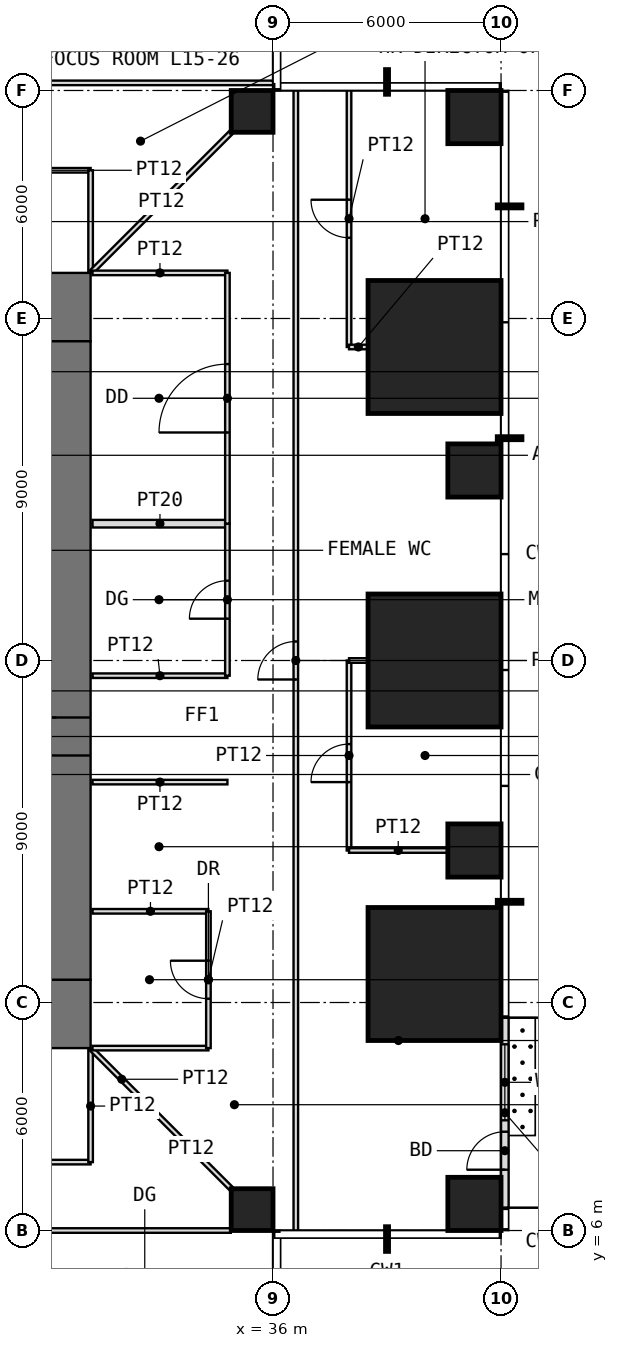
"""IFC4 building model, lengths in metres.
Left out: names, types, materials, properties, quantities, classifications, styles, units other than length and angle.
Written with IfcOpenShell. Run it as: python <this file> out.ifc"""

import sys

from ifc_helpers import new_model, si_unit, direction, frame, frame_2d, origin, origin_2d, place, context, subcontext, project, spatial, rectangle, extrude, element, fill, save


model = new_model("IFC4")
c1 = context("Model", 3, precision=1e-05, world=origin(), true_north=direction((0.0, 1.0)))
c2 = subcontext(c1, "Body", "Model", "MODEL_VIEW")
j1 = project(units=[si_unit("LENGTHUNIT", "METRE"), si_unit("PLANEANGLEUNIT", "RADIAN")], contexts=[c1])
p1 = place(None, origin())
s1 = spatial("IfcSite", under=j1, at=p1, CompositionType="ELEMENT")
p2 = place(p1, origin())
s2 = spatial("IfcBuilding", under=s1, at=p2, CompositionType="ELEMENT")
p3 = place(p2, frame((0.0, 0.0, 66.5)))
s3 = spatial("IfcBuildingStorey", under=s2, at=p3, CompositionType="ELEMENT", Elevation=66.5)
p4 = place(p3, frame((35.45, 6.55, 0.0), z_axis=(0.0, 0.0, 1.0), x_axis=(1.0, 0.0, 0.0)))
e1 = element("IfcColumn", 1, at=p4, inside=s3, PredefinedType="COLUMN", context=c2, shape_type="SweptSolid", body=[
    extrude(rectangle(XDim=1.1, YDim=1.1, at=origin_2d()), origin(), (0.0, 0.0, 1.0), 4.0),
])
p5 = place(p3, frame((41.3, 6.7, 0.0), z_axis=(0.0, 0.0, 1.0), x_axis=(1.0, 0.0, 0.0)))
e2 = element("IfcColumn", 2, at=p5, inside=s3, PredefinedType="COLUMN", context=c2, shape_type="SweptSolid", body=[
    extrude(rectangle(XDim=1.4, YDim=1.4, at=origin_2d()), origin(), (0.0, 0.0, 1.0), 4.0),
])
p6 = place(p3, frame((40.25, 12.75, 0.0), z_axis=(0.0, 0.0, 1.0), x_axis=(1.0, 0.0, 0.0)))
e3 = element("IfcColumn", 3, at=p6, inside=s3, PredefinedType="COLUMN", context=c2, shape_type="SweptSolid", body=[
    extrude(rectangle(XDim=3.5, YDim=3.5, at=origin_2d()), origin(), (0.0, 0.0, 1.0), 4.0),
])
p7 = place(p3, frame((41.3, 16.0, 0.0), z_axis=(0.0, 0.0, 1.0), x_axis=(1.0, 0.0, 0.0)))
e4 = element("IfcColumn", 4, at=p7, inside=s3, PredefinedType="COLUMN", context=c2, shape_type="SweptSolid", body=[
    extrude(rectangle(XDim=1.4, YDim=1.4, at=origin_2d()), origin(), (0.0, 0.0, 1.0), 4.0),
])
p8 = place(p3, frame((40.25, 21.0, 0.0), z_axis=(0.0, 0.0, 1.0), x_axis=(1.0, 0.0, 0.0)))
e5 = element("IfcColumn", 5, at=p8, inside=s3, PredefinedType="COLUMN", context=c2, shape_type="SweptSolid", body=[
    extrude(rectangle(XDim=3.5, YDim=3.5, at=origin_2d()), origin(), (0.0, 0.0, 1.0), 4.0),
])
p9 = place(p3, frame((41.3, 26.0, 0.0), z_axis=(0.0, 0.0, 1.0), x_axis=(1.0, 0.0, 0.0)))
e6 = element("IfcColumn", 6, at=p9, inside=s3, PredefinedType="COLUMN", context=c2, shape_type="SweptSolid", body=[
    extrude(rectangle(XDim=1.4, YDim=1.4, at=origin_2d()), origin(), (0.0, 0.0, 1.0), 4.0),
])
p10 = place(p3, frame((40.25, 29.25, 0.0), z_axis=(0.0, 0.0, 1.0), x_axis=(1.0, 0.0, 0.0)))
e7 = element("IfcColumn", 7, at=p10, inside=s3, PredefinedType="COLUMN", context=c2, shape_type="SweptSolid", body=[
    extrude(rectangle(XDim=3.5, YDim=3.5, at=origin_2d()), origin(), (0.0, 0.0, 1.0), 4.0),
])
p11 = place(p3, frame((35.45, 35.45, 0.0), z_axis=(0.0, 0.0, 1.0), x_axis=(1.0, 0.0, 0.0)))
e8 = element("IfcColumn", 8, at=p11, inside=s3, PredefinedType="COLUMN", context=c2, shape_type="SweptSolid", body=[
    extrude(rectangle(XDim=1.1, YDim=1.1, at=origin_2d()), origin(), (0.0, 0.0, 1.0), 4.0),
])
p12 = place(p3, frame((41.3, 35.3, 0.0), z_axis=(0.0, 0.0, 1.0), x_axis=(1.0, 0.0, 0.0)))
e9 = element("IfcColumn", 9, at=p12, inside=s3, PredefinedType="COLUMN", context=c2, shape_type="SweptSolid", body=[
    extrude(rectangle(XDim=1.4, YDim=1.4, at=origin_2d()), origin(), (0.0, 0.0, 1.0), 4.0),
])
p13 = place(p3, frame((42.1, 6.6, 0.0), z_axis=(0.0, 0.0, 1.0), x_axis=(0.0, 1.0, 0.0)))
e10 = element("IfcWall", 10, at=p13, inside=s3, PredefinedType="USERDEFINED", context=c2, shape_type="SweptSolid", body=[
    extrude(rectangle(XDim=5.0, YDim=0.2, at=frame_2d((2.5, 0.0))), origin(), (0.0, 0.0, 1.0), 3.75),
])
p14 = place(p13, frame((1.0, 0.0, 0.0)))
e11 = element("IfcOpeningElement", 11, at=p14, cuts=e10, PredefinedType="OPENING", context=c2, shape_type="SweptSolid", body=[
    extrude(rectangle(XDim=1.0, YDim=2.4, at=frame_2d((0.5, 1.2))), frame((0.0, 0.11, 0.0), z_axis=(0.0, -1.0, 0.0), x_axis=(1.0, 0.0, 0.0)), (0.0, 0.0, 1.0), 0.22),
])
p15 = place(p13, frame((2.3, 0.0, 0.3)))
e12 = element("IfcOpeningElement", 12, at=p15, cuts=e10, PredefinedType="OPENING", context=c2, shape_type="SweptSolid", body=[
    extrude(rectangle(XDim=2.0, YDim=2.7, at=frame_2d((1.0, 1.35))), frame((0.0, 0.11, 0.0), z_axis=(0.0, -1.0, 0.0), x_axis=(1.0, 0.0, 0.0)), (0.0, 0.0, 1.0), 0.22),
])
p16 = place(p3, frame((10.8, 11.7, -0.05), z_axis=(0.0, 0.0, 1.0), x_axis=(1.0, 0.0, 0.0)))
e13 = element("IfcWall", 13, at=p16, inside=s3, PredefinedType="SHEAR", context=c2, shape_type="SweptSolid", body=[
    extrude(rectangle(XDim=20.4, YDim=1.8, at=frame_2d((10.2, 0.0))), origin(), (0.0, 0.0, 1.0), 4.0),
])
p17 = place(p16, frame((9.2, 0.0, 0.05)))
e14 = element("IfcOpeningElement", 14, at=p17, cuts=e13, PredefinedType="OPENING", context=c2, shape_type="SweptSolid", body=[
    extrude(rectangle(XDim=2.0, YDim=2.2, at=frame_2d((1.0, 1.1))), frame((0.0, 0.91, 0.0), z_axis=(0.0, -1.0, 0.0), x_axis=(1.0, 0.0, 0.0)), (0.0, 0.0, 1.0), 1.82),
])
p18 = place(p3, frame((10.8, 30.3, -0.05), z_axis=(0.0, 0.0, 1.0), x_axis=(1.0, 0.0, 0.0)))
e15 = element("IfcWall", 15, at=p18, inside=s3, PredefinedType="SHEAR", context=c2, shape_type="SweptSolid", body=[
    extrude(rectangle(XDim=20.4, YDim=1.8, at=frame_2d((10.2, 0.0))), origin(), (0.0, 0.0, 1.0), 4.0),
])
p19 = place(p18, frame((9.2, 0.0, 0.05)))
e16 = element("IfcOpeningElement", 16, at=p19, cuts=e15, PredefinedType="OPENING", context=c2, shape_type="SweptSolid", body=[
    extrude(rectangle(XDim=2.0, YDim=2.2, at=frame_2d((1.0, 1.1))), frame((0.0, 0.91, 0.0), z_axis=(0.0, -1.0, 0.0), x_axis=(1.0, 0.0, 0.0)), (0.0, 0.0, 1.0), 1.82),
])
p20 = place(p3, frame((30.3, 12.6, -0.05), z_axis=(0.0, 0.0, 1.0), x_axis=(0.0, 1.0, 0.0)))
e17 = element("IfcWall", 17, at=p20, inside=s3, PredefinedType="SHEAR", context=c2, shape_type="SweptSolid", body=[
    extrude(rectangle(XDim=16.8, YDim=1.8, at=frame_2d((8.4, 0.0))), origin(), (0.0, 0.0, 1.0), 4.0),
])
p21 = place(p20, frame((5.9, 0.0, 0.05)))
e18 = element("IfcOpeningElement", 18, at=p21, cuts=e17, PredefinedType="OPENING", context=c2, shape_type="SweptSolid", body=[
    extrude(rectangle(XDim=1.0, YDim=2.2, at=frame_2d((0.5, 1.1))), frame((0.0, 0.91, 0.0), z_axis=(0.0, -1.0, 0.0), x_axis=(1.0, 0.0, 0.0)), (0.0, 0.0, 1.0), 1.82),
])
p22 = place(p3, frame((6.0, 36.2, 0.0), z_axis=(0.0, 0.0, 1.0), x_axis=(1.0, 0.0, 0.0)))
e19 = element("IfcWall", 19, at=p22, inside=s3, PredefinedType="PARTITIONING", context=c2, shape_type="SweptSolid", body=[
    extrude(rectangle(XDim=30.0, YDim=0.12, at=frame_2d((15.0, 0.0))), origin(), (0.0, 0.0, 1.0), 3.75),
])
p23 = place(p22, frame((14.5, 0.0, 0.0)))
e20 = element("IfcOpeningElement", 20, at=p23, cuts=e19, PredefinedType="OPENING", context=c2, shape_type="SweptSolid", body=[
    extrude(rectangle(XDim=1.0, YDim=2.4, at=frame_2d((0.5, 1.2))), frame((0.0, 0.07, 0.0), z_axis=(0.0, -1.0, 0.0), x_axis=(1.0, 0.0, 0.0)), (0.0, 0.0, 1.0), 0.14),
])
p24 = place(p3, frame((7.11, 6.0, 0.0), z_axis=(0.0, 0.0, 1.0), x_axis=(1.0, 0.0, 0.0)))
e21 = element("IfcWall", 21, at=p24, inside=s3, PredefinedType="PARTITIONING", context=c2, shape_type="SweptSolid", body=[
    extrude(rectangle(XDim=27.78, YDim=0.12, at=frame_2d((13.89, 0.0))), origin(), (0.0, 0.0, 1.0), 3.75),
])
p25 = place(p24, frame((13.39, 0.0, 0.0)))
e22 = element("IfcOpeningElement", 22, at=p25, cuts=e21, PredefinedType="OPENING", context=c2, shape_type="SweptSolid", body=[
    extrude(rectangle(XDim=1.0, YDim=2.4, at=frame_2d((0.5, 1.2))), frame((0.0, 0.07, 0.0), z_axis=(0.0, -1.0, 0.0), x_axis=(1.0, 0.0, 0.0)), (0.0, 0.0, 1.0), 0.14),
])
p26 = place(p3, frame((23.2, 7.8, 0.0), z_axis=(0.0, 0.0, 1.0), x_axis=(1.0, 0.0, 0.0)))
e23 = element("IfcWall", 23, at=p26, inside=s3, PredefinedType="PARTITIONING", context=c2, shape_type="SweptSolid", body=[
    extrude(rectangle(XDim=8.0, YDim=0.12, at=frame_2d((4.0, 0.0))), origin(), (0.0, 0.0, 1.0), 3.75),
])
p27 = place(p26, frame((3.1, 0.0, 0.0)))
e24 = element("IfcOpeningElement", 24, at=p27, cuts=e23, PredefinedType="OPENING", context=c2, shape_type="SweptSolid", body=[
    extrude(rectangle(XDim=1.8, YDim=2.4, at=frame_2d((0.9, 1.2))), frame((0.0, 0.07, 0.0), z_axis=(0.0, -1.0, 0.0), x_axis=(1.0, 0.0, 0.0)), (0.0, 0.0, 1.0), 0.14),
])
p28 = place(p3, frame((27.2, 33.9, 0.0), z_axis=(0.0, 0.0, 1.0), x_axis=(1.0, 0.0, 0.0)))
e25 = element("IfcWall", 25, at=p28, inside=s3, PredefinedType="PARTITIONING", context=c2, shape_type="SweptSolid", body=[
    extrude(rectangle(XDim=4.0, YDim=0.12, at=frame_2d((2.0, 0.0))), origin(), (0.0, 0.0, 1.0), 3.75),
])
p29 = place(p28, frame((1.5, 0.0, 0.0)))
e26 = element("IfcOpeningElement", 26, at=p29, cuts=e25, PredefinedType="OPENING", context=c2, shape_type="SweptSolid", body=[
    extrude(rectangle(XDim=1.0, YDim=2.2, at=frame_2d((0.5, 1.1))), frame((0.0, 0.07, 0.0), z_axis=(0.0, -1.0, 0.0), x_axis=(1.0, 0.0, 0.0)), (0.0, 0.0, 1.0), 0.14),
])
p30 = place(p3, frame((31.2, 7.8, 0.0), z_axis=(0.0, 0.0, 1.0), x_axis=(0.0, 1.0, 0.0)))
e27 = element("IfcWall", 27, at=p30, inside=s3, PredefinedType="PARTITIONING", context=c2, shape_type="SweptSolid", body=[
    extrude(rectangle(XDim=2.95, YDim=0.12, at=frame_2d((1.475, 0.0))), origin(), (0.0, 0.0, 1.0), 3.75),
])
p31 = place(p3, frame((31.2, 31.25, 0.0), z_axis=(0.0, 0.0, 1.0), x_axis=(0.0, 1.0, 0.0)))
e28 = element("IfcWall", 28, at=p31, inside=s3, PredefinedType="PARTITIONING", context=c2, shape_type="SweptSolid", body=[
    extrude(rectangle(XDim=2.65, YDim=0.12, at=frame_2d((1.325, 0.0))), origin(), (0.0, 0.0, 1.0), 3.75),
])
p32 = place(p3, frame((31.235, 10.765, 0.0), z_axis=(0.0, 0.0, 1.0), x_axis=(0.707106781187, -0.707106781187, 0.0)))
e29 = element("IfcWall", 29, at=p32, inside=s3, PredefinedType="PARTITIONING", context=c2, shape_type="SweptSolid", body=[
    extrude(rectangle(XDim=2.218, YDim=0.12, at=frame_2d((1.109, 0.0))), origin(), (0.0, 0.0, 1.0), 3.75),
])
p33 = place(p3, frame((31.235, 31.235, 0.0), z_axis=(0.0, 0.0, 1.0), x_axis=(0.707106781187, 0.707106781187, 0.0)))
e30 = element("IfcWall", 30, at=p33, inside=s3, PredefinedType="PARTITIONING", context=c2, shape_type="SweptSolid", body=[
    extrude(rectangle(XDim=5.168, YDim=0.12, at=frame_2d((2.584, 0.0))), origin(), (0.0, 0.0, 1.0), 3.75),
])
for number, where, z_axis, x_axis in (
    (31, (31.25, 10.8, 0.0), (0.0, 0.0, 1.0), (1.0, 0.0, 0.0)),
    (32, (31.25, 14.4, 0.0), (0.0, 0.0, 1.0), (1.0, 0.0, 0.0)),
):
    element("IfcWall", number, at=place(p3, frame(where, z_axis=z_axis, x_axis=x_axis)), inside=s3, PredefinedType="PARTITIONING", context=c2, shape_type="SweptSolid", body=[
        extrude(rectangle(XDim=3.05, YDim=0.12, at=frame_2d((1.525, 0.0))), origin(), (0.0, 0.0, 1.0), 3.75),
    ])
for number, where, z_axis, x_axis in (
    (33, (31.25, 17.8, 0.0), (0.0, 0.0, 1.0), (1.0, 0.0, 0.0)),
    (34, (31.25, 20.6, 0.0), (0.0, 0.0, 1.0), (1.0, 0.0, 0.0)),
):
    element("IfcWall", number, at=place(p3, frame(where, z_axis=z_axis, x_axis=x_axis)), inside=s3, PredefinedType="PARTITIONING", context=c2, shape_type="SweptSolid", body=[
        extrude(rectangle(XDim=3.55, YDim=0.12, at=frame_2d((1.775, 0.0))), origin(), (0.0, 0.0, 1.0), 3.75),
    ])
p34 = place(p3, frame((31.25, 24.6, 0.0), z_axis=(0.0, 0.0, 1.0), x_axis=(1.0, 0.0, 0.0)))
e35 = element("IfcWall", 35, at=p34, inside=s3, PredefinedType="PARTITIONING", context=c2, shape_type="SweptSolid", body=[
    extrude(rectangle(XDim=3.55, YDim=0.2, at=frame_2d((1.775, 0.0))), origin(), (0.0, 0.0, 1.0), 3.75),
])
p35 = place(p3, frame((31.25, 31.2, 0.0), z_axis=(0.0, 0.0, 1.0), x_axis=(1.0, 0.0, 0.0)))
e36 = element("IfcWall", 36, at=p35, inside=s3, PredefinedType="PARTITIONING", context=c2, shape_type="SweptSolid", body=[
    extrude(rectangle(XDim=3.55, YDim=0.12, at=frame_2d((1.775, 0.0))), origin(), (0.0, 0.0, 1.0), 3.75),
])
p36 = place(p3, frame((32.804, 9.196, 0.0), z_axis=(0.0, 0.0, 1.0), x_axis=(0.707106781187, -0.707106781187, 0.0)))
e37 = element("IfcWall", 37, at=p36, inside=s3, PredefinedType="PARTITIONING", context=c2, shape_type="SweptSolid", body=[
    extrude(rectangle(XDim=2.95, YDim=0.12, at=frame_2d((1.475, 0.0))), origin(), (0.0, 0.0, 1.0), 3.75),
])
p37 = place(p3, frame((34.3, 10.8, 0.0), z_axis=(0.0, 0.0, 1.0), x_axis=(0.0, 1.0, 0.0)))
e38 = element("IfcWall", 38, at=p37, inside=s3, PredefinedType="PARTITIONING", context=c2, shape_type="SweptSolid", body=[
    extrude(rectangle(XDim=3.6, YDim=0.12, at=frame_2d((1.8, 0.0))), origin(), (0.0, 0.0, 1.0), 3.75),
])
p38 = place(p37, frame((1.3, 0.0, 0.0)))
e39 = element("IfcOpeningElement", 39, at=p38, cuts=e38, PredefinedType="OPENING", context=c2, shape_type="SweptSolid", body=[
    extrude(rectangle(XDim=1.0, YDim=2.2, at=frame_2d((0.5, 1.1))), frame((0.0, 0.07, 0.0), z_axis=(0.0, -1.0, 0.0), x_axis=(1.0, 0.0, 0.0)), (0.0, 0.0, 1.0), 0.14),
])
p39 = place(p3, frame((34.8, 20.6, 0.0), z_axis=(0.0, 0.0, 1.0), x_axis=(0.0, 1.0, 0.0)))
e40 = element("IfcWall", 40, at=p39, inside=s3, PredefinedType="PARTITIONING", context=c2, shape_type="SweptSolid", body=[
    extrude(rectangle(XDim=4.0, YDim=0.12, at=frame_2d((2.0, 0.0))), origin(), (0.0, 0.0, 1.0), 3.75),
])
p40 = place(p39, frame((1.5, 0.0, 0.0)))
e41 = element("IfcOpeningElement", 41, at=p40, cuts=e40, PredefinedType="OPENING", context=c2, shape_type="SweptSolid", body=[
    extrude(rectangle(XDim=1.0, YDim=2.4, at=frame_2d((0.5, 1.2))), frame((0.0, 0.07, 0.0), z_axis=(0.0, -1.0, 0.0), x_axis=(1.0, 0.0, 0.0)), (0.0, 0.0, 1.0), 0.14),
])
p41 = place(p3, frame((34.8, 24.6, 0.0), z_axis=(0.0, 0.0, 1.0), x_axis=(0.0, 1.0, 0.0)))
e42 = element("IfcWall", 42, at=p41, inside=s3, PredefinedType="PARTITIONING", context=c2, shape_type="SweptSolid", body=[
    extrude(rectangle(XDim=6.6, YDim=0.12, at=frame_2d((3.3, 0.0))), origin(), (0.0, 0.0, 1.0), 3.75),
])
p42 = place(p41, frame((2.4, 0.0, 0.0)))
e43 = element("IfcOpeningElement", 43, at=p42, cuts=e42, PredefinedType="OPENING", context=c2, shape_type="SweptSolid", body=[
    extrude(rectangle(XDim=1.8, YDim=2.4, at=frame_2d((0.9, 1.2))), frame((0.0, 0.07, 0.0), z_axis=(0.0, -1.0, 0.0), x_axis=(1.0, 0.0, 0.0)), (0.0, 0.0, 1.0), 0.14),
])
p43 = place(p3, frame((36.6, 6.0, 0.0), z_axis=(0.0, 0.0, 1.0), x_axis=(0.0, 1.0, 0.0)))
e44 = element("IfcWall", 44, at=p43, inside=s3, PredefinedType="PARTITIONING", context=c2, shape_type="SweptSolid", body=[
    extrude(rectangle(XDim=30.0, YDim=0.12, at=frame_2d((15.0, 0.0))), origin(), (0.0, 0.0, 1.0), 3.75),
])
p44 = place(p43, frame((14.5, 0.0, 0.0)))
e45 = element("IfcOpeningElement", 45, at=p44, cuts=e44, PredefinedType="OPENING", context=c2, shape_type="SweptSolid", body=[
    extrude(rectangle(XDim=1.0, YDim=2.4, at=frame_2d((0.5, 1.2))), frame((0.0, 0.07, 0.0), z_axis=(0.0, -1.0, 0.0), x_axis=(1.0, 0.0, 0.0)), (0.0, 0.0, 1.0), 0.14),
])
p45 = place(p3, frame((38.0, 16.0, 0.0), z_axis=(0.0, 0.0, 1.0), x_axis=(0.0, 1.0, 0.0)))
e46 = element("IfcWall", 46, at=p45, inside=s3, PredefinedType="PARTITIONING", context=c2, shape_type="SweptSolid", body=[
    extrude(rectangle(XDim=5.0, YDim=0.12, at=frame_2d((2.5, 0.0))), origin(), (0.0, 0.0, 1.0), 3.75),
])
p46 = place(p45, frame((1.8, 0.0, 0.0)))
e47 = element("IfcOpeningElement", 47, at=p46, cuts=e46, PredefinedType="OPENING", context=c2, shape_type="SweptSolid", body=[
    extrude(rectangle(XDim=1.0, YDim=2.2, at=frame_2d((0.5, 1.1))), frame((0.0, 0.07, 0.0), z_axis=(0.0, -1.0, 0.0), x_axis=(1.0, 0.0, 0.0)), (0.0, 0.0, 1.0), 0.14),
])
p47 = place(p3, frame((38.0, 16.0, 0.0), z_axis=(0.0, 0.0, 1.0), x_axis=(1.0, 0.0, 0.0)))
e48 = element("IfcWall", 48, at=p47, inside=s3, PredefinedType="PARTITIONING", context=c2, shape_type="SweptSolid", body=[
    extrude(rectangle(XDim=2.59, YDim=0.12, at=frame_2d((1.295, 0.0))), origin(), (0.0, 0.0, 1.0), 3.75),
])
p48 = place(p3, frame((38.0, 21.0, 0.0), z_axis=(0.0, 0.0, 1.0), x_axis=(1.0, 0.0, 0.0)))
e49 = element("IfcWall", 49, at=p48, inside=s3, PredefinedType="PARTITIONING", context=c2, shape_type="SweptSolid", body=[
    extrude(rectangle(XDim=0.49, YDim=0.12, at=frame_2d((0.245, 0.0))), origin(), (0.0, 0.0, 1.0), 3.75),
])
p49 = place(p3, frame((38.0, 29.25, 0.0), z_axis=(0.0, 0.0, 1.0), x_axis=(0.0, 1.0, 0.0)))
e50 = element("IfcWall", 50, at=p49, inside=s3, PredefinedType="PARTITIONING", context=c2, shape_type="SweptSolid", body=[
    extrude(rectangle(XDim=6.75, YDim=0.12, at=frame_2d((3.375, 0.0))), origin(), (0.0, 0.0, 1.0), 3.75),
])
p50 = place(p49, frame((2.875, 0.0, 0.0)))
e51 = element("IfcOpeningElement", 51, at=p50, cuts=e50, PredefinedType="OPENING", context=c2, shape_type="SweptSolid", body=[
    extrude(rectangle(XDim=1.0, YDim=2.2, at=frame_2d((0.5, 1.1))), frame((0.0, 0.07, 0.0), z_axis=(0.0, -1.0, 0.0), x_axis=(1.0, 0.0, 0.0)), (0.0, 0.0, 1.0), 0.14),
])
p51 = place(p3, frame((38.0, 29.25, 0.0), z_axis=(0.0, 0.0, 1.0), x_axis=(1.0, 0.0, 0.0)))
e52 = element("IfcWall", 52, at=p51, inside=s3, PredefinedType="PARTITIONING", context=c2, shape_type="SweptSolid", body=[
    extrude(rectangle(XDim=0.49, YDim=0.12, at=frame_2d((0.245, 0.0))), origin(), (0.0, 0.0, 1.0), 3.75),
])
p52 = place(p14, origin())
e53 = element("IfcDoor", 53, at=p52, inside=s3, OperationType="SINGLE_SWING_LEFT", PredefinedType="DOOR", context=c2, shape_type="SweptSolid", body=[
    extrude(rectangle(XDim=1.0, YDim=2.4, at=frame_2d((0.5, 1.2))), frame((0.0, 0.025, 0.0), z_axis=(0.0, -1.0, 0.0), x_axis=(1.0, 0.0, 0.0)), (0.0, 0.0, 1.0), 0.05),
])
fill(e11, e53)
p53 = place(p15, origin())
e54 = element("IfcWindow", 54, at=p53, inside=s3, PartitioningType="SINGLE_PANEL", PredefinedType="WINDOW", context=c2, shape_type="SweptSolid", body=[
    extrude(rectangle(XDim=2.0, YDim=2.7, at=frame_2d((1.0, 1.35))), frame((0.0, 0.03, 0.0), z_axis=(0.0, -1.0, 0.0), x_axis=(1.0, 0.0, 0.0)), (0.0, 0.0, 1.0), 0.06),
])
fill(e12, e54)
p54 = place(p21, origin())
e55 = element("IfcDoor", 55, at=p54, inside=s3, OperationType="SINGLE_SWING_RIGHT", PredefinedType="DOOR", context=c2, shape_type="SweptSolid", body=[
    extrude(rectangle(XDim=1.0, YDim=2.2, at=frame_2d((0.5, 1.1))), frame((0.0, 0.025, 0.0), z_axis=(0.0, -1.0, 0.0), x_axis=(1.0, 0.0, 0.0)), (0.0, 0.0, 1.0), 0.05),
])
fill(e18, e55)
p55 = place(p38, origin())
e56 = element("IfcDoor", 56, at=p55, inside=s3, OperationType="SINGLE_SWING_RIGHT", PredefinedType="DOOR", context=c2, shape_type="SweptSolid", body=[
    extrude(rectangle(XDim=1.0, YDim=2.2, at=frame_2d((0.5, 1.1))), frame((0.0, 0.025, 0.0), z_axis=(0.0, -1.0, 0.0), x_axis=(1.0, 0.0, 0.0)), (0.0, 0.0, 1.0), 0.05),
])
fill(e39, e56)
p56 = place(p40, origin())
e57 = element("IfcDoor", 57, at=p56, inside=s3, OperationType="SINGLE_SWING_LEFT", PredefinedType="DOOR", context=c2, shape_type="SweptSolid", body=[
    extrude(rectangle(XDim=1.0, YDim=2.4, at=frame_2d((0.5, 1.2))), frame((0.0, 0.025, 0.0), z_axis=(0.0, -1.0, 0.0), x_axis=(1.0, 0.0, 0.0)), (0.0, 0.0, 1.0), 0.05),
])
fill(e41, e57)
p57 = place(p42, origin())
e58 = element("IfcDoor", 58, at=p57, inside=s3, OperationType="DOUBLE_DOOR_SINGLE_SWING", PredefinedType="DOOR", context=c2, shape_type="SweptSolid", body=[
    extrude(rectangle(XDim=1.8, YDim=2.4, at=frame_2d((0.9, 1.2))), frame((0.0, 0.025, 0.0), z_axis=(0.0, -1.0, 0.0), x_axis=(1.0, 0.0, 0.0)), (0.0, 0.0, 1.0), 0.05),
])
fill(e43, e58)
p58 = place(p46, origin())
e59 = element("IfcDoor", 59, at=p58, inside=s3, OperationType="SINGLE_SWING_LEFT", PredefinedType="DOOR", context=c2, shape_type="SweptSolid", body=[
    extrude(rectangle(XDim=1.0, YDim=2.2, at=frame_2d((0.5, 1.1))), frame((0.0, 0.025, 0.0), z_axis=(0.0, -1.0, 0.0), x_axis=(1.0, 0.0, 0.0)), (0.0, 0.0, 1.0), 0.05),
])
fill(e47, e59)
p59 = place(p50, origin())
e60 = element("IfcDoor", 60, at=p59, inside=s3, OperationType="SINGLE_SWING_RIGHT", PredefinedType="DOOR", context=c2, shape_type="SweptSolid", body=[
    extrude(rectangle(XDim=1.0, YDim=2.2, at=frame_2d((0.5, 1.1))), frame((0.0, 0.025, 0.0), z_axis=(0.0, -1.0, 0.0), x_axis=(1.0, 0.0, 0.0)), (0.0, 0.0, 1.0), 0.05),
])
fill(e51, e60)
p60 = place(p44, origin())
e61 = element("IfcDoor", 61, at=p60, inside=s3, OperationType="SINGLE_SWING_LEFT", PredefinedType="DOOR", context=c2, shape_type="SweptSolid", body=[
    extrude(rectangle(XDim=1.0, YDim=2.4, at=frame_2d((0.5, 1.2))), frame((0.0, 0.025, 0.0), z_axis=(0.0, -1.0, 0.0), x_axis=(1.0, 0.0, 0.0)), (0.0, 0.0, 1.0), 0.05),
])
fill(e45, e61)
save(model, sys.argv[1])
